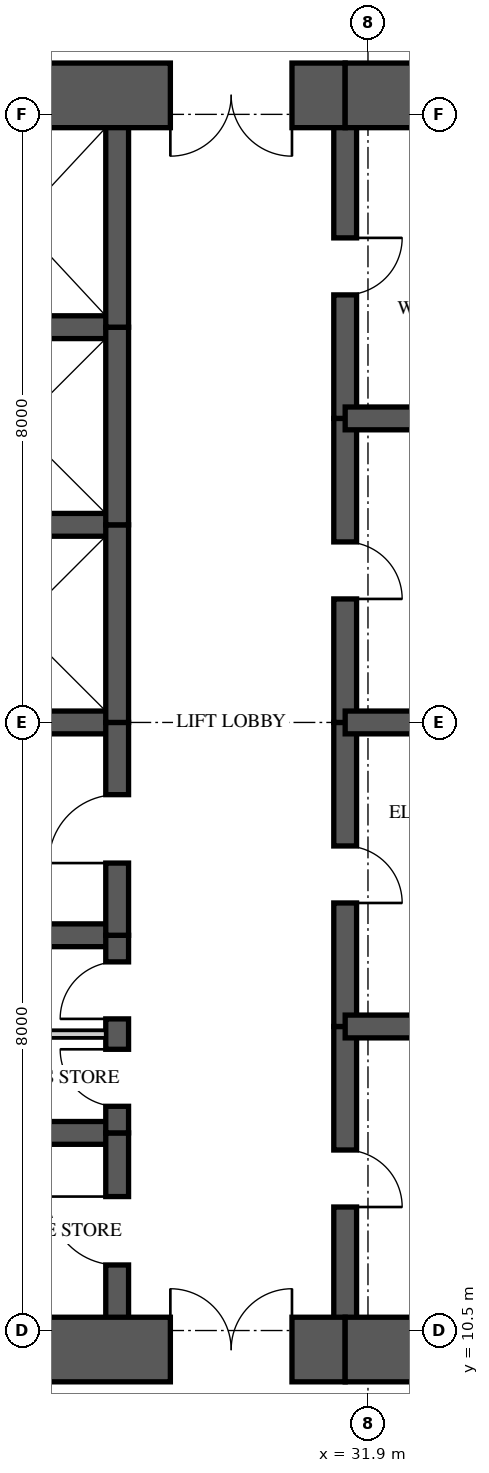
"""IFC4 building model, lengths in metres.
Left out: names, types, materials, properties, quantities, classifications, styles, units other than length and angle.
Written with IfcOpenShell. Run it as: python <this file> out.ifc"""

import sys

from ifc_helpers import new_model, si_unit, direction, frame, frame_2d, origin, place, context, subcontext, project, spatial, rectangle, extrude, element, fill, save


model = new_model("IFC4")
c1 = context("Model", 3, precision=1e-05, world=origin(), true_north=direction((0.0, 1.0)))
c2 = subcontext(c1, "Body", "Model", "MODEL_VIEW")
j1 = project(units=[si_unit("LENGTHUNIT", "METRE"), si_unit("PLANEANGLEUNIT", "RADIAN")], contexts=[c1])
p1 = place(None, origin())
s1 = spatial("IfcSite", under=j1, at=p1, CompositionType="ELEMENT")
p2 = place(p1, origin())
s2 = spatial("IfcBuilding", under=s1, at=p2, CompositionType="ELEMENT")
p3 = place(p2, frame((0.0, 0.0, 267.75)))
s3 = spatial("IfcBuildingStorey", under=s2, at=p3, CompositionType="ELEMENT", Elevation=267.75)
p4 = place(p3, frame((26.0, 10.25, 0.0), z_axis=(0.0, 0.0, 1.0), x_axis=(1.0, 0.0, 0.0)))
e1 = element("IfcWall", 1, at=p4, inside=s3, PredefinedType="SHEAR", context=c2, shape_type="SweptSolid", body=[
    extrude(rectangle(XDim=5.6, YDim=0.85, at=frame_2d((2.8, 0.0))), origin(), (0.0, 0.0, 1.0), 5.0),
])
p5 = place(p4, frame((3.3, 0.0, 0.0)))
e2 = element("IfcOpeningElement", 2, at=p5, cuts=e1, PredefinedType="OPENING", context=c2, shape_type="SweptSolid", body=[
    extrude(rectangle(XDim=1.6, YDim=2.1, at=frame_2d((0.8, 1.05))), frame((0.0, 0.435, 0.0), z_axis=(0.0, -1.0, 0.0), x_axis=(1.0, 0.0, 0.0)), (0.0, 0.0, 1.0), 0.87),
])
for number, where, z_axis, x_axis in (
    (3, (31.6, 10.25, 0.0), (0.0, 0.0, 1.0), (1.0, 0.0, 0.0)),
    (4, (35.9, 26.75, 0.0), (0.0, 0.0, 1.0), (-1.0, 0.0, 0.0)),
):
    element("IfcWall", number, at=place(p3, frame(where, z_axis=z_axis, x_axis=x_axis)), inside=s3, PredefinedType="SHEAR", context=c2, shape_type="SweptSolid", body=[
        extrude(rectangle(XDim=4.3, YDim=0.85, at=frame_2d((2.15, 0.0))), origin(), (0.0, 0.0, 1.0), 5.0),
    ])
p6 = place(p3, frame((31.6, 26.75, 0.0), z_axis=(0.0, 0.0, 1.0), x_axis=(-1.0, 0.0, 0.0)))
e5 = element("IfcWall", 5, at=p6, inside=s3, PredefinedType="SHEAR", context=c2, shape_type="SweptSolid", body=[
    extrude(rectangle(XDim=5.6, YDim=0.85, at=frame_2d((2.8, 0.0))), origin(), (0.0, 0.0, 1.0), 5.0),
])
p7 = place(p6, frame((0.7, 0.0, 0.0)))
e6 = element("IfcOpeningElement", 6, at=p7, cuts=e5, PredefinedType="OPENING", context=c2, shape_type="SweptSolid", body=[
    extrude(rectangle(XDim=1.6, YDim=2.1, at=frame_2d((0.8, 1.05))), frame((0.0, 0.435, 0.0), z_axis=(0.0, -1.0, 0.0), x_axis=(1.0, 0.0, 0.0)), (0.0, 0.0, 1.0), 0.87),
])
p8 = place(p3, frame((28.6, 10.25, 0.0), z_axis=(0.0, 0.0, 1.0), x_axis=(0.0, 1.0, 0.0)))
e7 = element("IfcWall", 7, at=p8, inside=s3, PredefinedType="SHEAR", context=c2, shape_type="SweptSolid", body=[
    extrude(rectangle(XDim=2.85, YDim=0.3, at=frame_2d((1.425, 0.0))), origin(), (0.0, 0.0, 1.0), 5.0),
])
p9 = place(p8, frame((1.113, 0.0, 0.0)))
e8 = element("IfcOpeningElement", 8, at=p9, cuts=e7, PredefinedType="OPENING", context=c2, shape_type="SweptSolid", body=[
    extrude(rectangle(XDim=0.9, YDim=2.1, at=frame_2d((0.45, 1.05))), frame((0.0, 0.16, 0.0), z_axis=(0.0, -1.0, 0.0), x_axis=(1.0, 0.0, 0.0)), (0.0, 0.0, 1.0), 0.32),
])
p10 = place(p3, frame((28.6, 13.1, 0.0), z_axis=(0.0, 0.0, 1.0), x_axis=(0.0, 1.0, 0.0)))
e9 = element("IfcWall", 9, at=p10, inside=s3, PredefinedType="SHEAR", context=c2, shape_type="SweptSolid", body=[
    extrude(rectangle(XDim=2.6, YDim=0.3, at=frame_2d((1.3, 0.0))), origin(), (0.0, 0.0, 1.0), 5.0),
])
p11 = place(p10, frame((0.35, 0.0, 0.0)))
e10 = element("IfcOpeningElement", 10, at=p11, cuts=e9, PredefinedType="OPENING", context=c2, shape_type="SweptSolid", body=[
    extrude(rectangle(XDim=0.75, YDim=2.1, at=frame_2d((0.375, 1.05))), frame((0.0, 0.16, 0.0), z_axis=(0.0, -1.0, 0.0), x_axis=(1.0, 0.0, 0.0)), (0.0, 0.0, 1.0), 0.32),
])
p12 = place(p10, frame((1.5, 0.0, 0.0)))
e11 = element("IfcOpeningElement", 11, at=p12, cuts=e9, PredefinedType="OPENING", context=c2, shape_type="SweptSolid", body=[
    extrude(rectangle(XDim=0.75, YDim=2.1, at=frame_2d((0.375, 1.05))), frame((0.0, 0.16, 0.0), z_axis=(0.0, -1.0, 0.0), x_axis=(1.0, 0.0, 0.0)), (0.0, 0.0, 1.0), 0.32),
])
p13 = place(p3, frame((28.6, 15.7, 0.0), z_axis=(0.0, 0.0, 1.0), x_axis=(0.0, 1.0, 0.0)))
e12 = element("IfcWall", 12, at=p13, inside=s3, PredefinedType="SHEAR", context=c2, shape_type="SweptSolid", body=[
    extrude(rectangle(XDim=2.8, YDim=0.3, at=frame_2d((1.4, 0.0))), origin(), (0.0, 0.0, 1.0), 5.0),
])
p14 = place(p13, frame((0.95, 0.0, 0.0)))
e13 = element("IfcOpeningElement", 13, at=p14, cuts=e12, PredefinedType="OPENING", context=c2, shape_type="SweptSolid", body=[
    extrude(rectangle(XDim=0.9, YDim=2.1, at=frame_2d((0.45, 1.05))), frame((0.0, 0.16, 0.0), z_axis=(0.0, -1.0, 0.0), x_axis=(1.0, 0.0, 0.0)), (0.0, 0.0, 1.0), 0.32),
])
p15 = place(p3, frame((28.6, 18.5, 0.0), z_axis=(0.0, 0.0, 1.0), x_axis=(0.0, 1.0, 0.0)))
e14 = element("IfcWall", 14, at=p15, inside=s3, PredefinedType="SHEAR", context=c2, shape_type="SweptSolid", body=[
    extrude(rectangle(XDim=2.6, YDim=0.3, at=frame_2d((1.3, 0.0))), origin(), (0.0, 0.0, 1.0), 5.0),
])
p16 = place(p3, frame((28.6, 21.1, 0.0), z_axis=(0.0, 0.0, 1.0), x_axis=(0.0, 1.0, 0.0)))
e15 = element("IfcWall", 15, at=p16, inside=s3, PredefinedType="SHEAR", context=c2, shape_type="SweptSolid", body=[
    extrude(rectangle(XDim=2.6, YDim=0.3, at=frame_2d((1.3, 0.0))), origin(), (0.0, 0.0, 1.0), 5.0),
])
p17 = place(p3, frame((28.6, 23.7, 0.0), z_axis=(0.0, 0.0, 1.0), x_axis=(0.0, 1.0, 0.0)))
e16 = element("IfcWall", 16, at=p17, inside=s3, PredefinedType="SHEAR", context=c2, shape_type="SweptSolid", body=[
    extrude(rectangle(XDim=3.05, YDim=0.3, at=frame_2d((1.525, 0.0))), origin(), (0.0, 0.0, 1.0), 5.0),
])
p18 = place(p3, frame((31.6, 10.25, 0.0), z_axis=(0.0, 0.0, 1.0), x_axis=(0.0, 1.0, 0.0)))
e17 = element("IfcWall", 17, at=p18, inside=s3, PredefinedType="SHEAR", context=c2, shape_type="SweptSolid", body=[
    extrude(rectangle(XDim=4.25, YDim=0.3, at=frame_2d((2.125, 0.0))), origin(), (0.0, 0.0, 1.0), 5.0),
])
p19 = place(p18, frame((1.875, 0.0, 0.0)))
e18 = element("IfcOpeningElement", 18, at=p19, cuts=e17, PredefinedType="OPENING", context=c2, shape_type="SweptSolid", body=[
    extrude(rectangle(XDim=0.75, YDim=2.1, at=frame_2d((0.375, 1.05))), frame((0.0, 0.16, 0.0), z_axis=(0.0, -1.0, 0.0), x_axis=(1.0, 0.0, 0.0)), (0.0, 0.0, 1.0), 0.32),
])
p20 = place(p3, frame((31.6, 14.5, 0.0), z_axis=(0.0, 0.0, 1.0), x_axis=(0.0, 1.0, 0.0)))
e19 = element("IfcWall", 19, at=p20, inside=s3, PredefinedType="SHEAR", context=c2, shape_type="SweptSolid", body=[
    extrude(rectangle(XDim=4.0, YDim=0.3, at=frame_2d((2.0, 0.0))), origin(), (0.0, 0.0, 1.0), 5.0),
])
p21 = place(p20, frame((1.625, 0.0, 0.0)))
e20 = element("IfcOpeningElement", 20, at=p21, cuts=e19, PredefinedType="OPENING", context=c2, shape_type="SweptSolid", body=[
    extrude(rectangle(XDim=0.75, YDim=2.1, at=frame_2d((0.375, 1.05))), frame((0.0, 0.16, 0.0), z_axis=(0.0, -1.0, 0.0), x_axis=(1.0, 0.0, 0.0)), (0.0, 0.0, 1.0), 0.32),
])
p22 = place(p3, frame((31.6, 18.5, 0.0), z_axis=(0.0, 0.0, 1.0), x_axis=(0.0, 1.0, 0.0)))
e21 = element("IfcWall", 21, at=p22, inside=s3, PredefinedType="SHEAR", context=c2, shape_type="SweptSolid", body=[
    extrude(rectangle(XDim=4.0, YDim=0.3, at=frame_2d((2.0, 0.0))), origin(), (0.0, 0.0, 1.0), 5.0),
])
p23 = place(p22, frame((1.625, 0.0, 0.0)))
e22 = element("IfcOpeningElement", 22, at=p23, cuts=e21, PredefinedType="OPENING", context=c2, shape_type="SweptSolid", body=[
    extrude(rectangle(XDim=0.75, YDim=2.1, at=frame_2d((0.375, 1.05))), frame((0.0, 0.16, 0.0), z_axis=(0.0, -1.0, 0.0), x_axis=(1.0, 0.0, 0.0)), (0.0, 0.0, 1.0), 0.32),
])
p24 = place(p3, frame((31.6, 22.5, 0.0), z_axis=(0.0, 0.0, 1.0), x_axis=(0.0, 1.0, 0.0)))
e23 = element("IfcWall", 23, at=p24, inside=s3, PredefinedType="SHEAR", context=c2, shape_type="SweptSolid", body=[
    extrude(rectangle(XDim=4.25, YDim=0.3, at=frame_2d((2.125, 0.0))), origin(), (0.0, 0.0, 1.0), 5.0),
])
p25 = place(p24, frame((1.625, 0.0, 0.0)))
e24 = element("IfcOpeningElement", 24, at=p25, cuts=e23, PredefinedType="OPENING", context=c2, shape_type="SweptSolid", body=[
    extrude(rectangle(XDim=0.75, YDim=2.1, at=frame_2d((0.375, 1.05))), frame((0.0, 0.16, 0.0), z_axis=(0.0, -1.0, 0.0), x_axis=(1.0, 0.0, 0.0)), (0.0, 0.0, 1.0), 0.32),
])
for number, where, z_axis, x_axis in (
    (25, (26.0, 13.1, 0.0), (0.0, 0.0, 1.0), (1.0, 0.0, 0.0)),
    (26, (26.0, 15.7, 0.0), (0.0, 0.0, 1.0), (1.0, 0.0, 0.0)),
    (27, (26.0, 18.5, 0.0), (0.0, 0.0, 1.0), (1.0, 0.0, 0.0)),
    (28, (26.0, 21.1, 0.0), (0.0, 0.0, 1.0), (1.0, 0.0, 0.0)),
    (29, (26.0, 23.7, 0.0), (0.0, 0.0, 1.0), (1.0, 0.0, 0.0)),
):
    element("IfcWall", number, at=place(p3, frame(where, z_axis=z_axis, x_axis=x_axis)), inside=s3, PredefinedType="SHEAR", context=c2, shape_type="SweptSolid", body=[
        extrude(rectangle(XDim=2.6, YDim=0.3, at=frame_2d((1.3, 0.0))), origin(), (0.0, 0.0, 1.0), 5.0),
    ])
for number, where, z_axis, x_axis in (
    (30, (31.6, 14.5, 0.0), (0.0, 0.0, 1.0), (1.0, 0.0, 0.0)),
    (31, (31.6, 18.5, 0.0), (0.0, 0.0, 1.0), (1.0, 0.0, 0.0)),
    (32, (31.6, 22.5, 0.0), (0.0, 0.0, 1.0), (1.0, 0.0, 0.0)),
):
    element("IfcWall", number, at=place(p3, frame(where, z_axis=z_axis, x_axis=x_axis)), inside=s3, PredefinedType="SHEAR", context=c2, shape_type="SweptSolid", body=[
        extrude(rectangle(XDim=4.3, YDim=0.3, at=frame_2d((2.15, 0.0))), origin(), (0.0, 0.0, 1.0), 5.0),
    ])
p26 = place(p3, frame((26.15, 14.4, 0.0), z_axis=(0.0, 0.0, 1.0), x_axis=(1.0, 0.0, 0.0)))
e33 = element("IfcWall", 33, at=p26, inside=s3, PredefinedType="PARTITIONING", context=c2, shape_type="SweptSolid", body=[
    extrude(rectangle(XDim=2.3, YDim=0.1, at=frame_2d((1.15, 0.0))), origin(), (0.0, 0.0, 1.0), 4.72),
])
p27 = place(p9, origin())
e34 = element("IfcDoor", 34, at=p27, inside=s3, OperationType="SINGLE_SWING_RIGHT", PredefinedType="DOOR", context=c2, shape_type="SweptSolid", body=[
    extrude(rectangle(XDim=0.9, YDim=2.1, at=frame_2d((0.45, 1.05))), frame((0.0, 0.025, 0.0), z_axis=(0.0, -1.0, 0.0), x_axis=(1.0, 0.0, 0.0)), (0.0, 0.0, 1.0), 0.05),
])
fill(e8, e34)
p28 = place(p11, origin())
e35 = element("IfcDoor", 35, at=p28, inside=s3, OperationType="SINGLE_SWING_RIGHT", PredefinedType="DOOR", context=c2, shape_type="SweptSolid", body=[
    extrude(rectangle(XDim=0.75, YDim=2.1, at=frame_2d((0.375, 1.05))), frame((0.0, 0.025, 0.0), z_axis=(0.0, -1.0, 0.0), x_axis=(1.0, 0.0, 0.0)), (0.0, 0.0, 1.0), 0.05),
])
fill(e10, e35)
p29 = place(p12, origin())
e36 = element("IfcDoor", 36, at=p29, inside=s3, OperationType="SINGLE_SWING_LEFT", PredefinedType="DOOR", context=c2, shape_type="SweptSolid", body=[
    extrude(rectangle(XDim=0.75, YDim=2.1, at=frame_2d((0.375, 1.05))), frame((0.0, 0.025, 0.0), z_axis=(0.0, -1.0, 0.0), x_axis=(1.0, 0.0, 0.0)), (0.0, 0.0, 1.0), 0.05),
])
fill(e11, e36)
p30 = place(p14, origin())
e37 = element("IfcDoor", 37, at=p30, inside=s3, OperationType="SINGLE_SWING_LEFT", PredefinedType="DOOR", context=c2, shape_type="SweptSolid", body=[
    extrude(rectangle(XDim=0.9, YDim=2.1, at=frame_2d((0.45, 1.05))), frame((0.0, 0.025, 0.0), z_axis=(0.0, -1.0, 0.0), x_axis=(1.0, 0.0, 0.0)), (0.0, 0.0, 1.0), 0.05),
])
fill(e13, e37)
p31 = place(p5, origin())
e38 = element("IfcDoor", 38, at=p31, inside=s3, OperationType="DOUBLE_DOOR_SINGLE_SWING", PredefinedType="DOOR", context=c2, shape_type="SweptSolid", body=[
    extrude(rectangle(XDim=1.6, YDim=2.1, at=frame_2d((0.8, 1.05))), frame((0.0, 0.025, 0.0), z_axis=(0.0, -1.0, 0.0), x_axis=(1.0, 0.0, 0.0)), (0.0, 0.0, 1.0), 0.05),
])
fill(e2, e38)
p32 = place(p7, origin())
e39 = element("IfcDoor", 39, at=p32, inside=s3, OperationType="DOUBLE_DOOR_SINGLE_SWING", PredefinedType="DOOR", context=c2, shape_type="SweptSolid", body=[
    extrude(rectangle(XDim=1.6, YDim=2.1, at=frame_2d((0.8, 1.05))), frame((0.0, 0.025, 0.0), z_axis=(0.0, -1.0, 0.0), x_axis=(1.0, 0.0, 0.0)), (0.0, 0.0, 1.0), 0.05),
])
fill(e6, e39)
p33 = place(p19, frame((0.75, 0.0, 0.0), z_axis=(0.0, 0.0, 1.0), x_axis=(-1.0, 0.0, 0.0)))
e40 = element("IfcDoor", 40, at=p33, inside=s3, OperationType="SINGLE_SWING_RIGHT", PredefinedType="DOOR", context=c2, shape_type="SweptSolid", body=[
    extrude(rectangle(XDim=0.75, YDim=2.1, at=frame_2d((0.375, 1.05))), frame((0.0, 0.025, 0.0), z_axis=(0.0, -1.0, 0.0), x_axis=(1.0, 0.0, 0.0)), (0.0, 0.0, 1.0), 0.05),
])
fill(e18, e40)
p34 = place(p21, frame((0.75, 0.0, 0.0), z_axis=(0.0, 0.0, 1.0), x_axis=(-1.0, 0.0, 0.0)))
e41 = element("IfcDoor", 41, at=p34, inside=s3, OperationType="SINGLE_SWING_RIGHT", PredefinedType="DOOR", context=c2, shape_type="SweptSolid", body=[
    extrude(rectangle(XDim=0.75, YDim=2.1, at=frame_2d((0.375, 1.05))), frame((0.0, 0.025, 0.0), z_axis=(0.0, -1.0, 0.0), x_axis=(1.0, 0.0, 0.0)), (0.0, 0.0, 1.0), 0.05),
])
fill(e20, e41)
p35 = place(p23, frame((0.75, 0.0, 0.0), z_axis=(0.0, 0.0, 1.0), x_axis=(-1.0, 0.0, 0.0)))
e42 = element("IfcDoor", 42, at=p35, inside=s3, OperationType="SINGLE_SWING_RIGHT", PredefinedType="DOOR", context=c2, shape_type="SweptSolid", body=[
    extrude(rectangle(XDim=0.75, YDim=2.1, at=frame_2d((0.375, 1.05))), frame((0.0, 0.025, 0.0), z_axis=(0.0, -1.0, 0.0), x_axis=(1.0, 0.0, 0.0)), (0.0, 0.0, 1.0), 0.05),
])
fill(e22, e42)
p36 = place(p25, frame((0.75, 0.0, 0.0), z_axis=(0.0, 0.0, 1.0), x_axis=(-1.0, 0.0, 0.0)))
e43 = element("IfcDoor", 43, at=p36, inside=s3, OperationType="SINGLE_SWING_LEFT", PredefinedType="DOOR", context=c2, shape_type="SweptSolid", body=[
    extrude(rectangle(XDim=0.75, YDim=2.1, at=frame_2d((0.375, 1.05))), frame((0.0, 0.025, 0.0), z_axis=(0.0, -1.0, 0.0), x_axis=(1.0, 0.0, 0.0)), (0.0, 0.0, 1.0), 0.05),
])
fill(e24, e43)
save(model, sys.argv[1])
